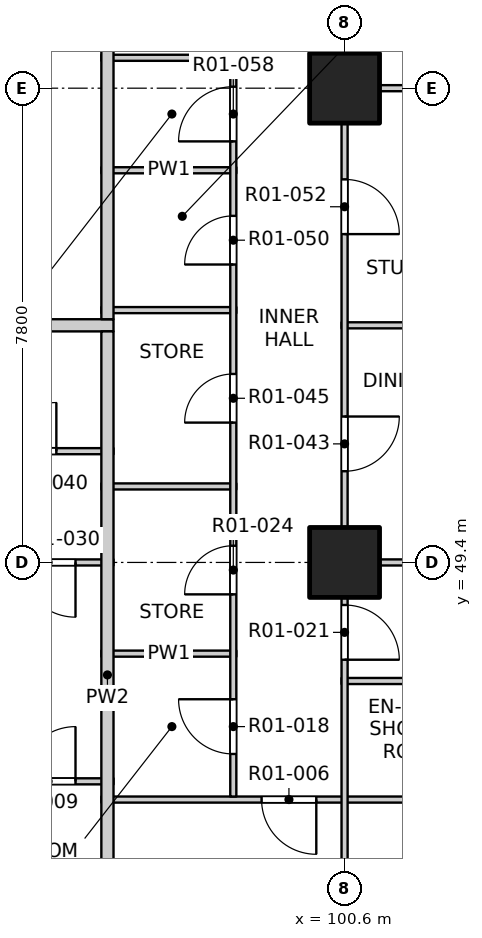
"""IFC4 building model, lengths in metres.
Left out: names, types, materials, properties, quantities, classifications, styles, units other than length and angle.
Written with IfcOpenShell. Run it as: python <this file> out.ifc"""

import sys

from ifc_helpers import new_model, si_unit, direction, frame, frame_2d, origin, origin_2d, place, context, subcontext, project, spatial, rectangle, extrude, element, fill, save


model = new_model("IFC4")
c1 = context("Model", 3, precision=1e-05, world=origin(), true_north=direction((0.0, 1.0)))
c2 = subcontext(c1, "Body", "Model", "MODEL_VIEW")
j1 = project(units=[si_unit("LENGTHUNIT", "METRE"), si_unit("PLANEANGLEUNIT", "RADIAN")], contexts=[c1])
p1 = place(None, origin())
s1 = spatial("IfcSite", under=j1, at=p1, CompositionType="ELEMENT")
p2 = place(p1, origin())
s2 = spatial("IfcBuilding", under=s1, at=p2, CompositionType="ELEMENT")
p3 = place(p2, frame((0.0, 0.0, 26.3)))
s3 = spatial("IfcBuildingStorey", under=s2, at=p3, CompositionType="ELEMENT", Elevation=26.3)
for number, where, z_axis, x_axis in (
    (1, (100.6, 49.4, -0.25), (0.0, 0.0, 1.0), (1.0, 0.0, 0.0)),
    (2, (100.6, 57.2, -0.25), (0.0, 0.0, 1.0), (1.0, 0.0, 0.0)),
):
    element("IfcColumn", number, at=place(p3, frame(where, z_axis=z_axis, x_axis=x_axis)), inside=s3, PredefinedType="COLUMN", context=c2, shape_type="SweptSolid", body=[
        extrude(rectangle(XDim=1.15, YDim=1.15, at=origin_2d()), origin(), (0.0, 0.0, 1.0), 3.4),
    ])
p4 = place(p3, frame((96.6, 45.5, 0.0), z_axis=(0.0, 0.0, 1.0), x_axis=(1.0, 0.0, 0.0)))
e3 = element("IfcWall", 3, at=p4, inside=s3, PredefinedType="PARTITIONING", context=c2, shape_type="SweptSolid", body=[
    extrude(rectangle(XDim=11.5, YDim=0.1, at=frame_2d((5.75, 0.0))), origin(), (0.0, 0.0, 1.0), 3.15),
])
p5 = place(p4, frame((2.635, 0.0, 0.0)))
e4 = element("IfcOpeningElement", 4, at=p5, cuts=e3, PredefinedType="OPENING", context=c2, shape_type="SweptSolid", body=[
    extrude(rectangle(XDim=0.9, YDim=2.1, at=frame_2d((0.45, 1.05))), frame((0.0, 0.06, 0.0), z_axis=(0.0, -1.0, 0.0), x_axis=(1.0, 0.0, 0.0)), (0.0, 0.0, 1.0), 0.12),
])
p6 = place(p3, frame((88.8, 45.8, 0.0), z_axis=(0.0, 0.0, 1.0), x_axis=(1.0, 0.0, 0.0)))
e5 = element("IfcWall", 5, at=p6, inside=s3, PredefinedType="PARTITIONING", context=c2, shape_type="SweptSolid", body=[
    extrude(rectangle(XDim=8.0, YDim=0.1, at=frame_2d((4.0, 0.0))), origin(), (0.0, 0.0, 1.0), 3.15),
])
p7 = place(p6, frame((1.45, 0.0, 0.0)))
e6 = element("IfcOpeningElement", 6, at=p7, cuts=e5, PredefinedType="OPENING", context=c2, shape_type="SweptSolid", body=[
    extrude(rectangle(XDim=1.2, YDim=2.1, at=frame_2d((0.6, 1.05))), frame((0.0, 0.06, 0.0), z_axis=(0.0, -1.0, 0.0), x_axis=(1.0, 0.0, 0.0)), (0.0, 0.0, 1.0), 0.12),
])
p8 = place(p6, frame((4.525, 0.0, 0.0)))
e7 = element("IfcOpeningElement", 7, at=p8, cuts=e5, PredefinedType="OPENING", context=c2, shape_type="SweptSolid", body=[
    extrude(rectangle(XDim=0.9, YDim=2.1, at=frame_2d((0.45, 1.05))), frame((0.0, 0.06, 0.0), z_axis=(0.0, -1.0, 0.0), x_axis=(1.0, 0.0, 0.0)), (0.0, 0.0, 1.0), 0.12),
])
p9 = place(p6, frame((6.475, 0.0, 0.0)))
e8 = element("IfcOpeningElement", 8, at=p9, cuts=e5, PredefinedType="OPENING", context=c2, shape_type="SweptSolid", body=[
    extrude(rectangle(XDim=0.9, YDim=2.1, at=frame_2d((0.45, 1.05))), frame((0.0, 0.06, 0.0), z_axis=(0.0, -1.0, 0.0), x_axis=(1.0, 0.0, 0.0)), (0.0, 0.0, 1.0), 0.12),
])
p10 = place(p3, frame((100.55, 47.45, 0.0), z_axis=(0.0, 0.0, 1.0), x_axis=(1.0, 0.0, 0.0)))
e9 = element("IfcWall", 9, at=p10, inside=s3, PredefinedType="PARTITIONING", context=c2, shape_type="SweptSolid", body=[
    extrude(rectangle(XDim=3.55, YDim=0.1, at=frame_2d((1.775, 0.0))), origin(), (0.0, 0.0, 1.0), 3.15),
])
p11 = place(p3, frame((96.6, 47.9, 0.0), z_axis=(0.0, 0.0, 1.0), x_axis=(1.0, 0.0, 0.0)))
e10 = element("IfcWall", 10, at=p11, inside=s3, PredefinedType="PARTITIONING", context=c2, shape_type="SweptSolid", body=[
    extrude(rectangle(XDim=2.22, YDim=0.1, at=frame_2d((1.11, 0.0))), origin(), (0.0, 0.0, 1.0), 3.15),
])
p12 = place(p3, frame((73.2, 49.4, 0.0), z_axis=(0.0, 0.0, 1.0), x_axis=(1.0, 0.0, 0.0)))
e11 = element("IfcWall", 11, at=p12, inside=s3, PredefinedType="PARTITIONING", context=c2, shape_type="SweptSolid", body=[
    extrude(rectangle(XDim=23.6, YDim=0.1, at=frame_2d((11.8, 0.0))), origin(), (0.0, 0.0, 1.0), 3.15),
])
p13 = place(p12, frame((2.425, 0.0, 0.0)))
e12 = element("IfcOpeningElement", 12, at=p13, cuts=e11, PredefinedType="OPENING", context=c2, shape_type="SweptSolid", body=[
    extrude(rectangle(XDim=0.9, YDim=2.1, at=frame_2d((0.45, 1.05))), frame((0.0, 0.06, 0.0), z_axis=(0.0, -1.0, 0.0), x_axis=(1.0, 0.0, 0.0)), (0.0, 0.0, 1.0), 0.12),
])
p14 = place(p12, frame((5.5, 0.0, 0.0)))
e13 = element("IfcOpeningElement", 13, at=p14, cuts=e11, PredefinedType="OPENING", context=c2, shape_type="SweptSolid", body=[
    extrude(rectangle(XDim=0.9, YDim=2.1, at=frame_2d((0.45, 1.05))), frame((0.0, 0.06, 0.0), z_axis=(0.0, -1.0, 0.0), x_axis=(1.0, 0.0, 0.0)), (0.0, 0.0, 1.0), 0.12),
])
p15 = place(p12, frame((9.4, 0.0, 0.0)))
e14 = element("IfcOpeningElement", 14, at=p15, cuts=e11, PredefinedType="OPENING", context=c2, shape_type="SweptSolid", body=[
    extrude(rectangle(XDim=0.9, YDim=2.1, at=frame_2d((0.45, 1.05))), frame((0.0, 0.06, 0.0), z_axis=(0.0, -1.0, 0.0), x_axis=(1.0, 0.0, 0.0)), (0.0, 0.0, 1.0), 0.12),
])
p16 = place(p12, frame((14.275, 0.0, 0.0)))
e15 = element("IfcOpeningElement", 15, at=p16, cuts=e11, PredefinedType="OPENING", context=c2, shape_type="SweptSolid", body=[
    extrude(rectangle(XDim=0.9, YDim=2.1, at=frame_2d((0.45, 1.05))), frame((0.0, 0.06, 0.0), z_axis=(0.0, -1.0, 0.0), x_axis=(1.0, 0.0, 0.0)), (0.0, 0.0, 1.0), 0.12),
])
p17 = place(p12, frame((17.2, 0.0, 0.0)))
e16 = element("IfcOpeningElement", 16, at=p17, cuts=e11, PredefinedType="OPENING", context=c2, shape_type="SweptSolid", body=[
    extrude(rectangle(XDim=0.9, YDim=2.1, at=frame_2d((0.45, 1.05))), frame((0.0, 0.06, 0.0), z_axis=(0.0, -1.0, 0.0), x_axis=(1.0, 0.0, 0.0)), (0.0, 0.0, 1.0), 0.12),
])
p18 = place(p12, frame((22.075, 0.0, 0.0)))
e17 = element("IfcOpeningElement", 17, at=p18, cuts=e11, PredefinedType="OPENING", context=c2, shape_type="SweptSolid", body=[
    extrude(rectangle(XDim=0.9, YDim=2.1, at=frame_2d((0.45, 1.05))), frame((0.0, 0.06, 0.0), z_axis=(0.0, -1.0, 0.0), x_axis=(1.0, 0.0, 0.0)), (0.0, 0.0, 1.0), 0.12),
])
p19 = place(p3, frame((100.55, 49.4, 0.0), z_axis=(0.0, 0.0, 1.0), x_axis=(1.0, 0.0, 0.0)))
e18 = element("IfcWall", 18, at=p19, inside=s3, PredefinedType="PARTITIONING", context=c2, shape_type="SweptSolid", body=[
    extrude(rectangle(XDim=7.55, YDim=0.1, at=frame_2d((3.775, 0.0))), origin(), (0.0, 0.0, 1.0), 2.55),
])
p20 = place(p3, frame((96.6, 50.65, 0.0), z_axis=(0.0, 0.0, 1.0), x_axis=(1.0, 0.0, 0.0)))
e19 = element("IfcWall", 19, at=p20, inside=s3, PredefinedType="PARTITIONING", context=c2, shape_type="SweptSolid", body=[
    extrude(rectangle(XDim=2.22, YDim=0.1, at=frame_2d((1.11, 0.0))), origin(), (0.0, 0.0, 1.0), 3.15),
])
p21 = place(p3, frame((91.25, 51.23, 0.0), z_axis=(0.0, 0.0, 1.0), x_axis=(1.0, 0.0, 0.0)))
e20 = element("IfcWall", 20, at=p21, inside=s3, PredefinedType="PARTITIONING", context=c2, shape_type="SweptSolid", body=[
    extrude(rectangle(XDim=5.55, YDim=0.1, at=frame_2d((2.775, 0.0))), origin(), (0.0, 0.0, 1.0), 3.15),
])
p22 = place(p21, frame((1.06, 0.0, 0.0)))
e21 = element("IfcOpeningElement", 21, at=p22, cuts=e20, PredefinedType="OPENING", context=c2, shape_type="SweptSolid", body=[
    extrude(rectangle(XDim=0.9, YDim=2.1, at=frame_2d((0.45, 1.05))), frame((0.0, 0.06, 0.0), z_axis=(0.0, -1.0, 0.0), x_axis=(1.0, 0.0, 0.0)), (0.0, 0.0, 1.0), 0.12),
])
p23 = place(p21, frame((3.81, 0.0, 0.0)))
e22 = element("IfcOpeningElement", 22, at=p23, cuts=e20, PredefinedType="OPENING", context=c2, shape_type="SweptSolid", body=[
    extrude(rectangle(XDim=0.8, YDim=2.1, at=frame_2d((0.4, 1.05))), frame((0.0, 0.06, 0.0), z_axis=(0.0, -1.0, 0.0), x_axis=(1.0, 0.0, 0.0)), (0.0, 0.0, 1.0), 0.12),
])
p24 = place(p3, frame((73.2, 53.3, 0.0), z_axis=(0.0, 0.0, 1.0), x_axis=(1.0, 0.0, 0.0)))
e23 = element("IfcWall", 23, at=p24, inside=s3, PredefinedType="PARTITIONING", context=c2, shape_type="SweptSolid", body=[
    extrude(rectangle(XDim=23.6, YDim=0.2, at=frame_2d((11.8, 0.0))), origin(), (0.0, 0.0, 1.0), 3.15),
])
p25 = place(p24, frame((6.525, 0.0, 0.0)))
e24 = element("IfcOpeningElement", 24, at=p25, cuts=e23, PredefinedType="OPENING", context=c2, shape_type="SweptSolid", body=[
    extrude(rectangle(XDim=1.0, YDim=2.1, at=frame_2d((0.5, 1.05))), frame((0.0, 0.11, 0.0), z_axis=(0.0, -1.0, 0.0), x_axis=(1.0, 0.0, 0.0)), (0.0, 0.0, 1.0), 0.22),
])
p26 = place(p24, frame((18.275, 0.0, 0.0)))
e25 = element("IfcOpeningElement", 25, at=p26, cuts=e23, PredefinedType="OPENING", context=c2, shape_type="SweptSolid", body=[
    extrude(rectangle(XDim=1.0, YDim=2.1, at=frame_2d((0.5, 1.05))), frame((0.0, 0.11, 0.0), z_axis=(0.0, -1.0, 0.0), x_axis=(1.0, 0.0, 0.0)), (0.0, 0.0, 1.0), 0.22),
])
p27 = place(p3, frame((100.55, 53.3, 0.0), z_axis=(0.0, 0.0, 1.0), x_axis=(1.0, 0.0, 0.0)))
e26 = element("IfcWall", 26, at=p27, inside=s3, PredefinedType="PARTITIONING", context=c2, shape_type="SweptSolid", body=[
    extrude(rectangle(XDim=7.55, YDim=0.1, at=frame_2d((3.775, 0.0))), origin(), (0.0, 0.0, 1.0), 3.15),
])
for number, where, z_axis, x_axis in (
    (27, (96.6, 53.55, 0.0), (0.0, 0.0, 1.0), (1.0, 0.0, 0.0)),
    (28, (96.6, 55.85, 0.0), (0.0, 0.0, 1.0), (1.0, 0.0, 0.0)),
):
    element("IfcWall", number, at=place(p3, frame(where, z_axis=z_axis, x_axis=x_axis)), inside=s3, PredefinedType="PARTITIONING", context=c2, shape_type="SweptSolid", body=[
        extrude(rectangle(XDim=2.22, YDim=0.1, at=frame_2d((1.11, 0.0))), origin(), (0.0, 0.0, 1.0), 3.15),
    ])
p28 = place(p3, frame((100.55, 57.2, 0.0), z_axis=(0.0, 0.0, 1.0), x_axis=(1.0, 0.0, 0.0)))
e29 = element("IfcWall", 29, at=p28, inside=s3, PredefinedType="PARTITIONING", context=c2, shape_type="SweptSolid", body=[
    extrude(rectangle(XDim=7.55, YDim=0.1, at=frame_2d((3.775, 0.0))), origin(), (0.0, 0.0, 1.0), 2.55),
])
p29 = place(p3, frame((96.6, 57.7, 0.0), z_axis=(0.0, 0.0, 1.0), x_axis=(1.0, 0.0, 0.0)))
e30 = element("IfcWall", 30, at=p29, inside=s3, PredefinedType="PARTITIONING", context=c2, shape_type="SweptSolid", body=[
    extrude(rectangle(XDim=2.22, YDim=0.1, at=frame_2d((1.11, 0.0))), origin(), (0.0, 0.0, 1.0), 3.15),
])
p30 = place(p3, frame((96.7, 41.9, 0.0), z_axis=(0.0, 0.0, 1.0), x_axis=(0.0, 1.0, 0.0)))
e31 = element("IfcWall", 31, at=p30, inside=s3, PredefinedType="PARTITIONING", context=c2, shape_type="SweptSolid", body=[
    extrude(rectangle(XDim=11.3, YDim=0.2, at=frame_2d((5.65, 0.0))), origin(), (0.0, 0.0, 1.0), 3.15),
])
p31 = place(p3, frame((96.7, 53.4, 0.0), z_axis=(0.0, 0.0, 1.0), x_axis=(0.0, 1.0, 0.0)))
e32 = element("IfcWall", 32, at=p31, inside=s3, PredefinedType="PARTITIONING", context=c2, shape_type="SweptSolid", body=[
    extrude(rectangle(XDim=31.0, YDim=0.2, at=frame_2d((15.5, 0.0))), origin(), (0.0, 0.0, 1.0), 3.15),
])
p32 = place(p31, frame((5.575, 0.0, 0.0)))
e33 = element("IfcOpeningElement", 33, at=p32, cuts=e32, PredefinedType="OPENING", context=c2, shape_type="SweptSolid", body=[
    extrude(rectangle(XDim=1.0, YDim=2.1, at=frame_2d((0.5, 1.05))), frame((0.0, 0.11, 0.0), z_axis=(0.0, -1.0, 0.0), x_axis=(1.0, 0.0, 0.0)), (0.0, 0.0, 1.0), 0.22),
])
p33 = place(p31, frame((10.075, 0.0, 0.0)))
e34 = element("IfcOpeningElement", 34, at=p33, cuts=e32, PredefinedType="OPENING", context=c2, shape_type="SweptSolid", body=[
    extrude(rectangle(XDim=1.0, YDim=2.1, at=frame_2d((0.5, 1.05))), frame((0.0, 0.11, 0.0), z_axis=(0.0, -1.0, 0.0), x_axis=(1.0, 0.0, 0.0)), (0.0, 0.0, 1.0), 0.22),
])
p34 = place(p31, frame((28.975, 0.0, 0.0)))
e35 = element("IfcOpeningElement", 35, at=p34, cuts=e32, PredefinedType="OPENING", context=c2, shape_type="SweptSolid", body=[
    extrude(rectangle(XDim=1.0, YDim=2.1, at=frame_2d((0.5, 1.05))), frame((0.0, 0.11, 0.0), z_axis=(0.0, -1.0, 0.0), x_axis=(1.0, 0.0, 0.0)), (0.0, 0.0, 1.0), 0.22),
])
p35 = place(p3, frame((98.77, 45.55, 0.0), z_axis=(0.0, 0.0, 1.0), x_axis=(0.0, 1.0, 0.0)))
e36 = element("IfcWall", 36, at=p35, inside=s3, PredefinedType="PARTITIONING", context=c2, shape_type="SweptSolid", body=[
    extrude(rectangle(XDim=12.1, YDim=0.1, at=frame_2d((6.05, 0.0))), origin(), (0.0, 0.0, 1.0), 3.15),
])
p36 = place(p35, frame((0.7, 0.0, 0.0)))
e37 = element("IfcOpeningElement", 37, at=p36, cuts=e36, PredefinedType="OPENING", context=c2, shape_type="SweptSolid", body=[
    extrude(rectangle(XDim=0.9, YDim=2.1, at=frame_2d((0.45, 1.05))), frame((0.0, 0.06, 0.0), z_axis=(0.0, -1.0, 0.0), x_axis=(1.0, 0.0, 0.0)), (0.0, 0.0, 1.0), 0.12),
])
p37 = place(p35, frame((3.325, 0.0, 0.0)))
e38 = element("IfcOpeningElement", 38, at=p37, cuts=e36, PredefinedType="OPENING", context=c2, shape_type="SweptSolid", body=[
    extrude(rectangle(XDim=0.8, YDim=2.1, at=frame_2d((0.4, 1.05))), frame((0.0, 0.06, 0.0), z_axis=(0.0, -1.0, 0.0), x_axis=(1.0, 0.0, 0.0)), (0.0, 0.0, 1.0), 0.12),
])
p38 = place(p35, frame((6.15, 0.0, 0.0)))
e39 = element("IfcOpeningElement", 39, at=p38, cuts=e36, PredefinedType="OPENING", context=c2, shape_type="SweptSolid", body=[
    extrude(rectangle(XDim=0.8, YDim=2.1, at=frame_2d((0.4, 1.05))), frame((0.0, 0.06, 0.0), z_axis=(0.0, -1.0, 0.0), x_axis=(1.0, 0.0, 0.0)), (0.0, 0.0, 1.0), 0.12),
])
p39 = place(p35, frame((8.75, 0.0, 0.0)))
e40 = element("IfcOpeningElement", 40, at=p39, cuts=e36, PredefinedType="OPENING", context=c2, shape_type="SweptSolid", body=[
    extrude(rectangle(XDim=0.8, YDim=2.1, at=frame_2d((0.4, 1.05))), frame((0.0, 0.06, 0.0), z_axis=(0.0, -1.0, 0.0), x_axis=(1.0, 0.0, 0.0)), (0.0, 0.0, 1.0), 0.12),
])
p40 = place(p35, frame((10.775, 0.0, 0.0)))
e41 = element("IfcOpeningElement", 41, at=p40, cuts=e36, PredefinedType="OPENING", context=c2, shape_type="SweptSolid", body=[
    extrude(rectangle(XDim=0.9, YDim=2.1, at=frame_2d((0.45, 1.05))), frame((0.0, 0.06, 0.0), z_axis=(0.0, -1.0, 0.0), x_axis=(1.0, 0.0, 0.0)), (0.0, 0.0, 1.0), 0.12),
])
p41 = place(p3, frame((100.6, 41.9, 0.0), z_axis=(0.0, 0.0, 1.0), x_axis=(0.0, 1.0, 0.0)))
e42 = element("IfcWall", 42, at=p41, inside=s3, PredefinedType="PARTITIONING", context=c2, shape_type="SweptSolid", body=[
    extrude(rectangle(XDim=7.5, YDim=0.1, at=frame_2d((3.75, 0.0))), origin(), (0.0, 0.0, 1.0), 2.55),
])
p42 = place(p41, frame((1.2, 0.0, 0.0)))
e43 = element("IfcOpeningElement", 43, at=p42, cuts=e42, PredefinedType="OPENING", context=c2, shape_type="SweptSolid", body=[
    extrude(rectangle(XDim=0.9, YDim=2.1, at=frame_2d((0.45, 1.05))), frame((0.0, 0.06, 0.0), z_axis=(0.0, -1.0, 0.0), x_axis=(1.0, 0.0, 0.0)), (0.0, 0.0, 1.0), 0.12),
])
p43 = place(p41, frame((5.9, 0.0, 0.0)))
e44 = element("IfcOpeningElement", 44, at=p43, cuts=e42, PredefinedType="OPENING", context=c2, shape_type="SweptSolid", body=[
    extrude(rectangle(XDim=0.9, YDim=2.1, at=frame_2d((0.45, 1.05))), frame((0.0, 0.06, 0.0), z_axis=(0.0, -1.0, 0.0), x_axis=(1.0, 0.0, 0.0)), (0.0, 0.0, 1.0), 0.12),
])
p44 = place(p3, frame((100.6, 49.4, 0.0), z_axis=(0.0, 0.0, 1.0), x_axis=(0.0, 1.0, 0.0)))
e45 = element("IfcWall", 45, at=p44, inside=s3, PredefinedType="PARTITIONING", context=c2, shape_type="SweptSolid", body=[
    extrude(rectangle(XDim=31.2, YDim=0.1, at=frame_2d((15.6, 0.0))), origin(), (0.0, 0.0, 1.0), 3.15),
])
p45 = place(p44, frame((1.5, 0.0, 0.0)))
e46 = element("IfcOpeningElement", 46, at=p45, cuts=e45, PredefinedType="OPENING", context=c2, shape_type="SweptSolid", body=[
    extrude(rectangle(XDim=0.9, YDim=2.1, at=frame_2d((0.45, 1.05))), frame((0.0, 0.06, 0.0), z_axis=(0.0, -1.0, 0.0), x_axis=(1.0, 0.0, 0.0)), (0.0, 0.0, 1.0), 0.12),
])
p46 = place(p44, frame((5.4, 0.0, 0.0)))
e47 = element("IfcOpeningElement", 47, at=p46, cuts=e45, PredefinedType="OPENING", context=c2, shape_type="SweptSolid", body=[
    extrude(rectangle(XDim=0.9, YDim=2.1, at=frame_2d((0.45, 1.05))), frame((0.0, 0.06, 0.0), z_axis=(0.0, -1.0, 0.0), x_axis=(1.0, 0.0, 0.0)), (0.0, 0.0, 1.0), 0.12),
])
p47 = place(p44, frame((10.275, 0.0, 0.0)))
e48 = element("IfcOpeningElement", 48, at=p47, cuts=e45, PredefinedType="OPENING", context=c2, shape_type="SweptSolid", body=[
    extrude(rectangle(XDim=0.9, YDim=2.1, at=frame_2d((0.45, 1.05))), frame((0.0, 0.06, 0.0), z_axis=(0.0, -1.0, 0.0), x_axis=(1.0, 0.0, 0.0)), (0.0, 0.0, 1.0), 0.12),
])
p48 = place(p44, frame((14.0, 0.0, 0.0)))
e49 = element("IfcOpeningElement", 49, at=p48, cuts=e45, PredefinedType="OPENING", context=c2, shape_type="SweptSolid", body=[
    extrude(rectangle(XDim=0.9, YDim=2.1, at=frame_2d((0.45, 1.05))), frame((0.0, 0.06, 0.0), z_axis=(0.0, -1.0, 0.0), x_axis=(1.0, 0.0, 0.0)), (0.0, 0.0, 1.0), 0.12),
])
p49 = place(p44, frame((17.1, 0.0, 0.0)))
e50 = element("IfcOpeningElement", 50, at=p49, cuts=e45, PredefinedType="OPENING", context=c2, shape_type="SweptSolid", body=[
    extrude(rectangle(XDim=0.9, YDim=2.1, at=frame_2d((0.45, 1.05))), frame((0.0, 0.06, 0.0), z_axis=(0.0, -1.0, 0.0), x_axis=(1.0, 0.0, 0.0)), (0.0, 0.0, 1.0), 0.12),
])
p50 = place(p44, frame((21.8, 0.0, 0.0)))
e51 = element("IfcOpeningElement", 51, at=p50, cuts=e45, PredefinedType="OPENING", context=c2, shape_type="SweptSolid", body=[
    extrude(rectangle(XDim=0.9, YDim=2.1, at=frame_2d((0.45, 1.05))), frame((0.0, 0.06, 0.0), z_axis=(0.0, -1.0, 0.0), x_axis=(1.0, 0.0, 0.0)), (0.0, 0.0, 1.0), 0.12),
])
p51 = place(p44, frame((24.9, 0.0, 0.0)))
e52 = element("IfcOpeningElement", 52, at=p51, cuts=e45, PredefinedType="OPENING", context=c2, shape_type="SweptSolid", body=[
    extrude(rectangle(XDim=0.9, YDim=2.1, at=frame_2d((0.45, 1.05))), frame((0.0, 0.06, 0.0), z_axis=(0.0, -1.0, 0.0), x_axis=(1.0, 0.0, 0.0)), (0.0, 0.0, 1.0), 0.12),
])
p52 = place(p44, frame((28.8, 0.0, 0.0)))
e53 = element("IfcOpeningElement", 53, at=p52, cuts=e45, PredefinedType="OPENING", context=c2, shape_type="SweptSolid", body=[
    extrude(rectangle(XDim=0.9, YDim=2.1, at=frame_2d((0.45, 1.05))), frame((0.0, 0.06, 0.0), z_axis=(0.0, -1.0, 0.0), x_axis=(1.0, 0.0, 0.0)), (0.0, 0.0, 1.0), 0.12),
])
p53 = place(p5, origin())
e54 = element("IfcDoor", 54, at=p53, inside=s3, OperationType="SINGLE_SWING_LEFT", PredefinedType="DOOR", context=c2, shape_type="SweptSolid", body=[
    extrude(rectangle(XDim=0.9, YDim=2.1, at=frame_2d((0.45, 1.05))), frame((0.0, 0.025, 0.0), z_axis=(0.0, -1.0, 0.0), x_axis=(1.0, 0.0, 0.0)), (0.0, 0.0, 1.0), 0.05),
])
fill(e4, e54)
p54 = place(p9, origin())
e55 = element("IfcDoor", 55, at=p54, inside=s3, OperationType="SINGLE_SWING_RIGHT", PredefinedType="DOOR", context=c2, shape_type="SweptSolid", body=[
    extrude(rectangle(XDim=0.9, YDim=2.1, at=frame_2d((0.45, 1.05))), frame((0.0, 0.025, 0.0), z_axis=(0.0, -1.0, 0.0), x_axis=(1.0, 0.0, 0.0)), (0.0, 0.0, 1.0), 0.05),
])
fill(e8, e55)
p55 = place(p36, origin())
e56 = element("IfcDoor", 56, at=p55, inside=s3, OperationType="SINGLE_SWING_RIGHT", PredefinedType="DOOR", context=c2, shape_type="SweptSolid", body=[
    extrude(rectangle(XDim=0.9, YDim=2.1, at=frame_2d((0.45, 1.05))), frame((0.0, 0.025, 0.0), z_axis=(0.0, -1.0, 0.0), x_axis=(1.0, 0.0, 0.0)), (0.0, 0.0, 1.0), 0.05),
])
fill(e37, e56)
p56 = place(p43, origin())
e57 = element("IfcDoor", 57, at=p56, inside=s3, OperationType="SINGLE_SWING_RIGHT", PredefinedType="DOOR", context=c2, shape_type="SweptSolid", body=[
    extrude(rectangle(XDim=0.9, YDim=2.1, at=frame_2d((0.45, 1.05))), frame((0.0, 0.025, 0.0), z_axis=(0.0, -1.0, 0.0), x_axis=(1.0, 0.0, 0.0)), (0.0, 0.0, 1.0), 0.05),
])
fill(e44, e57)
p57 = place(p37, origin())
e58 = element("IfcDoor", 58, at=p57, inside=s3, OperationType="SINGLE_SWING_LEFT", PredefinedType="DOOR", context=c2, shape_type="SweptSolid", body=[
    extrude(rectangle(XDim=0.8, YDim=2.1, at=frame_2d((0.4, 1.05))), frame((0.0, 0.025, 0.0), z_axis=(0.0, -1.0, 0.0), x_axis=(1.0, 0.0, 0.0)), (0.0, 0.0, 1.0), 0.05),
])
fill(e38, e58)
p58 = place(p18, origin())
e59 = element("IfcDoor", 59, at=p58, inside=s3, OperationType="SINGLE_SWING_LEFT", PredefinedType="DOOR", context=c2, shape_type="SweptSolid", body=[
    extrude(rectangle(XDim=0.9, YDim=2.1, at=frame_2d((0.45, 1.05))), frame((0.0, 0.025, 0.0), z_axis=(0.0, -1.0, 0.0), x_axis=(1.0, 0.0, 0.0)), (0.0, 0.0, 1.0), 0.05),
])
fill(e17, e59)
p59 = place(p23, origin())
e60 = element("IfcDoor", 60, at=p59, inside=s3, OperationType="SINGLE_SWING_RIGHT", PredefinedType="DOOR", context=c2, shape_type="SweptSolid", body=[
    extrude(rectangle(XDim=0.8, YDim=2.1, at=frame_2d((0.4, 1.05))), frame((0.0, 0.025, 0.0), z_axis=(0.0, -1.0, 0.0), x_axis=(1.0, 0.0, 0.0)), (0.0, 0.0, 1.0), 0.05),
])
fill(e22, e60)
p60 = place(p45, origin())
e61 = element("IfcDoor", 61, at=p60, inside=s3, OperationType="SINGLE_SWING_LEFT", PredefinedType="DOOR", context=c2, shape_type="SweptSolid", body=[
    extrude(rectangle(XDim=0.9, YDim=2.1, at=frame_2d((0.45, 1.05))), frame((0.0, 0.025, 0.0), z_axis=(0.0, -1.0, 0.0), x_axis=(1.0, 0.0, 0.0)), (0.0, 0.0, 1.0), 0.05),
])
fill(e46, e61)
p61 = place(p38, origin())
e62 = element("IfcDoor", 62, at=p61, inside=s3, OperationType="SINGLE_SWING_LEFT", PredefinedType="DOOR", context=c2, shape_type="SweptSolid", body=[
    extrude(rectangle(XDim=0.8, YDim=2.1, at=frame_2d((0.4, 1.05))), frame((0.0, 0.025, 0.0), z_axis=(0.0, -1.0, 0.0), x_axis=(1.0, 0.0, 0.0)), (0.0, 0.0, 1.0), 0.05),
])
fill(e39, e62)
p62 = place(p39, origin())
e63 = element("IfcDoor", 63, at=p62, inside=s3, OperationType="SINGLE_SWING_LEFT", PredefinedType="DOOR", context=c2, shape_type="SweptSolid", body=[
    extrude(rectangle(XDim=0.8, YDim=2.1, at=frame_2d((0.4, 1.05))), frame((0.0, 0.025, 0.0), z_axis=(0.0, -1.0, 0.0), x_axis=(1.0, 0.0, 0.0)), (0.0, 0.0, 1.0), 0.05),
])
fill(e40, e63)
p63 = place(p46, origin())
e64 = element("IfcDoor", 64, at=p63, inside=s3, OperationType="SINGLE_SWING_RIGHT", PredefinedType="DOOR", context=c2, shape_type="SweptSolid", body=[
    extrude(rectangle(XDim=0.9, YDim=2.1, at=frame_2d((0.45, 1.05))), frame((0.0, 0.025, 0.0), z_axis=(0.0, -1.0, 0.0), x_axis=(1.0, 0.0, 0.0)), (0.0, 0.0, 1.0), 0.05),
])
fill(e47, e64)
p64 = place(p40, origin())
e65 = element("IfcDoor", 65, at=p64, inside=s3, OperationType="SINGLE_SWING_LEFT", PredefinedType="DOOR", context=c2, shape_type="SweptSolid", body=[
    extrude(rectangle(XDim=0.9, YDim=2.1, at=frame_2d((0.45, 1.05))), frame((0.0, 0.025, 0.0), z_axis=(0.0, -1.0, 0.0), x_axis=(1.0, 0.0, 0.0)), (0.0, 0.0, 1.0), 0.05),
])
fill(e41, e65)
save(model, sys.argv[1])
